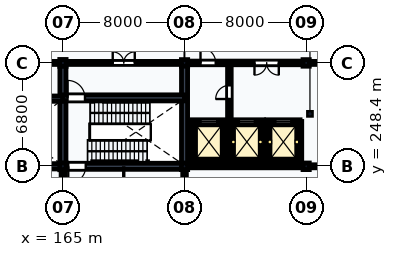
"""IFC4 building model, lengths in metres.
Left out: names, types, materials, properties, quantities, classifications, styles, units other than length and angle.
Written with IfcOpenShell. Run it as: python <this file> out.ifc"""

import sys

from ifc_helpers import new_model, si_unit, direction, frame, frame_2d, origin, origin_2d, place, context, subcontext, project, spatial, rectangle, i_section, extrude, element, fill, save


model = new_model("IFC4")
c1 = context("Model", 3, precision=1e-05, world=origin(), true_north=direction((0.0, 1.0)))
c2 = subcontext(c1, "Body", "Model", "MODEL_VIEW")
j1 = project(units=[si_unit("LENGTHUNIT", "METRE"), si_unit("PLANEANGLEUNIT", "RADIAN")], contexts=[c1])
p1 = place(None, origin())
s1 = spatial("IfcSite", under=j1, at=p1, CompositionType="ELEMENT")
p2 = place(p1, origin())
s2 = spatial("IfcBuilding", under=s1, at=p2, CompositionType="ELEMENT")
p3 = place(p2, origin())
s3 = spatial("IfcBuildingStorey", under=s2, at=p3, CompositionType="ELEMENT", Elevation=0.0)
for number, where, z_axis, x_axis in (
    (1, (165.0, 248.4, 0.0), (0.0, 0.0, 1.0), (1.0, 0.0, 0.0)),
    (2, (165.0, 255.2, 0.0), (0.0, 0.0, 1.0), (1.0, 0.0, 0.0)),
):
    element("IfcColumn", number, at=place(p3, frame(where, z_axis=z_axis, x_axis=x_axis)), inside=s3, PredefinedType="COLUMN", context=c2, shape_type="SweptSolid", body=[
        extrude(i_section(OverallWidth=0.418, OverallDepth=0.455, WebThickness=0.042, FlangeThickness=0.068, FilletRadius=0.015, at=origin_2d()), origin(), (0.0, 0.0, 1.0), 5.4),
    ])
for number, where, z_axis, x_axis in (
    (3, (173.0, 248.4, 0.0), (0.0, 0.0, 1.0), (1.0, 0.0, 0.0)),
    (4, (173.0, 255.2, 0.0), (0.0, 0.0, 1.0), (1.0, 0.0, 0.0)),
    (5, (181.0, 248.4, 0.0), (0.0, 0.0, 1.0), (1.0, 0.0, 0.0)),
    (6, (181.0, 255.2, 0.0), (0.0, 0.0, 1.0), (1.0, 0.0, 0.0)),
):
    element("IfcColumn", number, at=place(p3, frame(where, z_axis=z_axis, x_axis=x_axis)), inside=s3, PredefinedType="COLUMN", context=c2, shape_type="SweptSolid", body=[
        extrude(i_section(OverallWidth=0.412, OverallDepth=0.435, WebThickness=0.036, FlangeThickness=0.057, FilletRadius=0.015, at=origin_2d()), origin(), (0.0, 0.0, 1.0), 5.4),
    ])
p4 = place(p3, frame((165.0, 248.4, 0.0), z_axis=(0.0, 0.0, 1.0), x_axis=(1.0, 0.0, 0.0)))
e7 = element("IfcWall", 7, at=p4, inside=s3, PredefinedType="SHEAR", context=c2, shape_type="SweptSolid", body=[
    extrude(rectangle(XDim=8.0, YDim=0.4, at=frame_2d((4.0, 0.0))), origin(), (0.0, 0.0, 1.0), 5.14),
])
p5 = place(p4, frame((0.35, 0.0, 0.0)))
e8 = element("IfcOpeningElement", 8, at=p5, cuts=e7, PredefinedType="OPENING", context=c2, shape_type="SweptSolid", body=[
    extrude(rectangle(XDim=1.15, YDim=2.15, at=frame_2d((0.575, 1.075))), frame((0.0, 0.215, 0.0), z_axis=(0.0, -1.0, 0.0), x_axis=(1.0, 0.0, 0.0)), (0.0, 0.0, 1.0), 0.43),
])
for number, where, z_axis, x_axis in (
    (9, (165.0, 248.4, 0.0), (0.0, 0.0, 1.0), (0.0, 1.0, 0.0)),
    (10, (173.0, 248.4, 0.0), (0.0, 0.0, 1.0), (0.0, 1.0, 0.0)),
):
    element("IfcWall", number, at=place(p3, frame(where, z_axis=z_axis, x_axis=x_axis)), inside=s3, PredefinedType="SHEAR", context=c2, shape_type="SweptSolid", body=[
        extrude(rectangle(XDim=6.8, YDim=0.4, at=frame_2d((3.4, 0.0))), origin(), (0.0, 0.0, 1.0), 5.14),
    ])
p6 = place(p3, frame((165.0, 252.9, 0.0), z_axis=(0.0, 0.0, 1.0), x_axis=(1.0, 0.0, 0.0)))
e11 = element("IfcWall", 11, at=p6, inside=s3, PredefinedType="SHEAR", context=c2, shape_type="SweptSolid", body=[
    extrude(rectangle(XDim=8.0, YDim=0.4, at=frame_2d((4.0, 0.0))), origin(), (0.0, 0.0, 1.0), 5.14),
])
p7 = place(p6, frame((0.3, 0.0, 0.0)))
e12 = element("IfcOpeningElement", 12, at=p7, cuts=e11, PredefinedType="OPENING", context=c2, shape_type="SweptSolid", body=[
    extrude(rectangle(XDim=1.15, YDim=2.15, at=frame_2d((0.575, 1.075))), frame((0.0, 0.215, 0.0), z_axis=(0.0, -1.0, 0.0), x_axis=(1.0, 0.0, 0.0)), (0.0, 0.0, 1.0), 0.43),
])
p8 = place(p3, frame((165.0, 255.2, 0.0), z_axis=(0.0, 0.0, 1.0), x_axis=(1.0, 0.0, 0.0)))
e13 = element("IfcWall", 13, at=p8, inside=s3, PredefinedType="PARTITIONING", context=c2, shape_type="SweptSolid", body=[
    extrude(rectangle(XDim=8.0, YDim=0.2, at=frame_2d((4.0, 0.0))), origin(), (0.0, 0.0, 1.0), 4.638),
])
p9 = place(p8, frame((3.275, 0.0, 0.0)))
e14 = element("IfcOpeningElement", 14, at=p9, cuts=e13, PredefinedType="OPENING", context=c2, shape_type="SweptSolid", body=[
    extrude(rectangle(XDim=1.45, YDim=2.2, at=frame_2d((0.725, 1.1))), frame((0.0, 0.115, 0.0), z_axis=(0.0, -1.0, 0.0), x_axis=(1.0, 0.0, 0.0)), (0.0, 0.0, 1.0), 0.23),
])
p10 = place(p3, frame((157.5, 248.4, 0.0), z_axis=(0.0, 0.0, 1.0), x_axis=(1.0, 0.0, 0.0)))
e15 = element("IfcWall", 15, at=p10, inside=s3, PredefinedType="SHEAR", context=c2, shape_type="SweptSolid", body=[
    extrude(rectangle(XDim=7.5, YDim=0.35, at=frame_2d((3.75, 0.0))), origin(), (0.0, 0.0, 1.0), 5.14),
])
p11 = place(p10, frame((0.325, 0.0, 0.0)))
e16 = element("IfcOpeningElement", 16, at=p11, cuts=e15, PredefinedType="OPENING", context=c2, shape_type="SweptSolid", body=[
    extrude(rectangle(XDim=1.15, YDim=2.15, at=frame_2d((0.575, 1.075))), frame((0.0, 0.19, 0.0), z_axis=(0.0, -1.0, 0.0), x_axis=(1.0, 0.0, 0.0)), (0.0, 0.0, 1.0), 0.38),
])
p12 = place(p3, frame((157.5, 252.85, 0.0), z_axis=(0.0, 0.0, 1.0), x_axis=(1.0, 0.0, 0.0)))
e17 = element("IfcWall", 17, at=p12, inside=s3, PredefinedType="SHEAR", context=c2, shape_type="SweptSolid", body=[
    extrude(rectangle(XDim=7.5, YDim=0.35, at=frame_2d((3.75, 0.0))), origin(), (0.0, 0.0, 1.0), 5.14),
])
p13 = place(p12, frame((0.275, 0.0, 0.0)))
e18 = element("IfcOpeningElement", 18, at=p13, cuts=e17, PredefinedType="OPENING", context=c2, shape_type="SweptSolid", body=[
    extrude(rectangle(XDim=1.15, YDim=2.15, at=frame_2d((0.575, 1.075))), frame((0.0, 0.19, 0.0), z_axis=(0.0, -1.0, 0.0), x_axis=(1.0, 0.0, 0.0)), (0.0, 0.0, 1.0), 0.38),
])
p14 = place(p3, frame((157.5, 255.2, 0.0), z_axis=(0.0, 0.0, 1.0), x_axis=(1.0, 0.0, 0.0)))
e19 = element("IfcWall", 19, at=p14, inside=s3, PredefinedType="PARTITIONING", context=c2, shape_type="SweptSolid", body=[
    extrude(rectangle(XDim=7.5, YDim=0.2, at=frame_2d((3.75, 0.0))), origin(), (0.0, 0.0, 1.0), 4.778),
])
p15 = place(p14, frame((3.025, 0.0, 0.0)))
e20 = element("IfcOpeningElement", 20, at=p15, cuts=e19, PredefinedType="OPENING", context=c2, shape_type="SweptSolid", body=[
    extrude(rectangle(XDim=1.45, YDim=2.2, at=frame_2d((0.725, 1.1))), frame((0.0, 0.115, 0.0), z_axis=(0.0, -1.0, 0.0), x_axis=(1.0, 0.0, 0.0)), (0.0, 0.0, 1.0), 0.23),
])
p16 = place(p3, frame((173.5, 248.65, 0.0), z_axis=(0.0, 0.0, 1.0), x_axis=(1.0, 0.0, 0.0)))
e21 = element("IfcWall", 21, at=p16, inside=s3, PredefinedType="SHEAR", context=c2, shape_type="SweptSolid", body=[
    extrude(rectangle(XDim=2.2, YDim=0.22, at=frame_2d((1.1, 0.0))), origin(), (0.0, 0.0, 1.0), 5.14),
])
for number, where, z_axis, x_axis in (
    (22, (173.5, 248.65, 0.0), (0.0, 0.0, 1.0), (0.0, 1.0, 0.0)),
    (23, (175.7, 248.65, 0.0), (0.0, 0.0, 1.0), (0.0, 1.0, 0.0)),
):
    element("IfcWall", number, at=place(p3, frame(where, z_axis=z_axis, x_axis=x_axis)), inside=s3, PredefinedType="SHEAR", context=c2, shape_type="SweptSolid", body=[
        extrude(rectangle(XDim=2.7, YDim=0.22, at=frame_2d((1.35, 0.0))), origin(), (0.0, 0.0, 1.0), 5.14),
    ])
p17 = place(p3, frame((173.5, 251.35, 0.0), z_axis=(0.0, 0.0, 1.0), x_axis=(1.0, 0.0, 0.0)))
e24 = element("IfcWall", 24, at=p17, inside=s3, PredefinedType="SHEAR", context=c2, shape_type="SweptSolid", body=[
    extrude(rectangle(XDim=2.2, YDim=0.22, at=frame_2d((1.1, 0.0))), origin(), (0.0, 0.0, 1.0), 5.14),
])
p18 = place(p17, frame((0.55, 0.0, 0.0)))
e25 = element("IfcOpeningElement", 25, at=p18, cuts=e24, PredefinedType="OPENING", context=c2, shape_type="SweptSolid", body=[
    extrude(rectangle(XDim=1.1, YDim=2.15, at=frame_2d((0.55, 1.075))), frame((0.0, 0.125, 0.0), z_axis=(0.0, -1.0, 0.0), x_axis=(1.0, 0.0, 0.0)), (0.0, 0.0, 1.0), 0.25),
])
p19 = place(p3, frame((176.0, 248.65, 0.0), z_axis=(0.0, 0.0, 1.0), x_axis=(1.0, 0.0, 0.0)))
e26 = element("IfcWall", 26, at=p19, inside=s3, PredefinedType="SHEAR", context=c2, shape_type="SweptSolid", body=[
    extrude(rectangle(XDim=2.2, YDim=0.22, at=frame_2d((1.1, 0.0))), origin(), (0.0, 0.0, 1.0), 5.14),
])
for number, where, z_axis, x_axis in (
    (27, (176.0, 248.65, 0.0), (0.0, 0.0, 1.0), (0.0, 1.0, 0.0)),
    (28, (178.2, 248.65, 0.0), (0.0, 0.0, 1.0), (0.0, 1.0, 0.0)),
):
    element("IfcWall", number, at=place(p3, frame(where, z_axis=z_axis, x_axis=x_axis)), inside=s3, PredefinedType="SHEAR", context=c2, shape_type="SweptSolid", body=[
        extrude(rectangle(XDim=2.7, YDim=0.22, at=frame_2d((1.35, 0.0))), origin(), (0.0, 0.0, 1.0), 5.14),
    ])
p20 = place(p3, frame((176.0, 251.35, 0.0), z_axis=(0.0, 0.0, 1.0), x_axis=(1.0, 0.0, 0.0)))
e29 = element("IfcWall", 29, at=p20, inside=s3, PredefinedType="SHEAR", context=c2, shape_type="SweptSolid", body=[
    extrude(rectangle(XDim=2.2, YDim=0.22, at=frame_2d((1.1, 0.0))), origin(), (0.0, 0.0, 1.0), 5.14),
])
p21 = place(p20, frame((0.575, 0.0, 0.0)))
e30 = element("IfcOpeningElement", 30, at=p21, cuts=e29, PredefinedType="OPENING", context=c2, shape_type="SweptSolid", body=[
    extrude(rectangle(XDim=1.05, YDim=2.15, at=frame_2d((0.525, 1.075))), frame((0.0, 0.125, 0.0), z_axis=(0.0, -1.0, 0.0), x_axis=(1.0, 0.0, 0.0)), (0.0, 0.0, 1.0), 0.25),
])
p22 = place(p3, frame((178.4, 248.65, 0.0), z_axis=(0.0, 0.0, 1.0), x_axis=(1.0, 0.0, 0.0)))
e31 = element("IfcWall", 31, at=p22, inside=s3, PredefinedType="SHEAR", context=c2, shape_type="SweptSolid", body=[
    extrude(rectangle(XDim=2.2, YDim=0.22, at=frame_2d((1.1, 0.0))), origin(), (0.0, 0.0, 1.0), 5.14),
])
for number, where, z_axis, x_axis in (
    (32, (178.4, 248.65, 0.0), (0.0, 0.0, 1.0), (0.0, 1.0, 0.0)),
    (33, (180.6, 248.65, 0.0), (0.0, 0.0, 1.0), (0.0, 1.0, 0.0)),
):
    element("IfcWall", number, at=place(p3, frame(where, z_axis=z_axis, x_axis=x_axis)), inside=s3, PredefinedType="SHEAR", context=c2, shape_type="SweptSolid", body=[
        extrude(rectangle(XDim=2.7, YDim=0.22, at=frame_2d((1.35, 0.0))), origin(), (0.0, 0.0, 1.0), 5.14),
    ])
p23 = place(p3, frame((178.4, 251.35, 0.0), z_axis=(0.0, 0.0, 1.0), x_axis=(1.0, 0.0, 0.0)))
e34 = element("IfcWall", 34, at=p23, inside=s3, PredefinedType="SHEAR", context=c2, shape_type="SweptSolid", body=[
    extrude(rectangle(XDim=2.2, YDim=0.22, at=frame_2d((1.1, 0.0))), origin(), (0.0, 0.0, 1.0), 5.14),
])
p24 = place(p23, frame((0.575, 0.0, 0.0)))
e35 = element("IfcOpeningElement", 35, at=p24, cuts=e34, PredefinedType="OPENING", context=c2, shape_type="SweptSolid", body=[
    extrude(rectangle(XDim=1.05, YDim=2.15, at=frame_2d((0.525, 1.075))), frame((0.0, 0.125, 0.0), z_axis=(0.0, -1.0, 0.0), x_axis=(1.0, 0.0, 0.0)), (0.0, 0.0, 1.0), 0.25),
])
p25 = place(p3, frame((175.95, 251.35, 0.0), z_axis=(0.0, 0.0, 1.0), x_axis=(0.0, 1.0, 0.0)))
e36 = element("IfcWall", 36, at=p25, inside=s3, PredefinedType="PARTITIONING", context=c2, shape_type="SweptSolid", body=[
    extrude(rectangle(XDim=3.85, YDim=0.24, at=frame_2d((1.925, 0.0))), origin(), (0.0, 0.0, 1.0), 5.14),
])
p26 = place(p25, frame((1.475, 0.0, 0.0)))
e37 = element("IfcOpeningElement", 37, at=p26, cuts=e36, PredefinedType="OPENING", context=c2, shape_type="SweptSolid", body=[
    extrude(rectangle(XDim=0.9, YDim=2.1, at=frame_2d((0.45, 1.05))), frame((0.0, 0.135, 0.0), z_axis=(0.0, -1.0, 0.0), x_axis=(1.0, 0.0, 0.0)), (0.0, 0.0, 1.0), 0.27),
])
p27 = place(p3, frame((181.0, 248.4, 0.0), z_axis=(0.0, 0.0, 1.0), x_axis=(1.0, 0.0, 0.0)))
e38 = element("IfcWall", 38, at=p27, inside=s3, PredefinedType="PARTITIONING", context=c2, shape_type="SweptSolid", body=[
    extrude(rectangle(XDim=8.0, YDim=0.2, at=frame_2d((4.0, 0.0))), origin(), (0.0, 0.0, 1.0), 4.638),
])
p28 = place(p3, frame((173.0, 255.2, 0.0), z_axis=(0.0, 0.0, 1.0), x_axis=(1.0, 0.0, 0.0)))
e39 = element("IfcWall", 39, at=p28, inside=s3, PredefinedType="PARTITIONING", context=c2, shape_type="SweptSolid", body=[
    extrude(rectangle(XDim=8.0, YDim=0.24, at=frame_2d((4.0, 0.0))), origin(), (0.0, 0.0, 1.0), 4.638),
])
p29 = place(p28, frame((1.05, 0.0, 0.0)))
e40 = element("IfcOpeningElement", 40, at=p29, cuts=e39, PredefinedType="OPENING", context=c2, shape_type="SweptSolid", body=[
    extrude(rectangle(XDim=1.0, YDim=2.1, at=frame_2d((0.5, 1.05))), frame((0.0, 0.135, 0.0), z_axis=(0.0, -1.0, 0.0), x_axis=(1.0, 0.0, 0.0)), (0.0, 0.0, 1.0), 0.27),
])
p30 = place(p28, frame((4.6, 0.0, 0.0)))
e41 = element("IfcOpeningElement", 41, at=p30, cuts=e39, PredefinedType="OPENING", context=c2, shape_type="SweptSolid", body=[
    extrude(rectangle(XDim=1.6, YDim=2.25, at=frame_2d((0.8, 1.125))), frame((0.0, 0.135, 0.0), z_axis=(0.0, -1.0, 0.0), x_axis=(1.0, 0.0, 0.0)), (0.0, 0.0, 1.0), 0.27),
])
p31 = place(p3, frame((181.0, 255.2, 0.0), z_axis=(0.0, 0.0, 1.0), x_axis=(1.0, 0.0, 0.0)))
e42 = element("IfcWall", 42, at=p31, inside=s3, PredefinedType="PARTITIONING", context=c2, shape_type="SweptSolid", body=[
    extrude(rectangle(XDim=8.0, YDim=0.2, at=frame_2d((4.0, 0.0))), origin(), (0.0, 0.0, 1.0), 4.638),
])
p32 = place(p31, frame((0.85, 0.0, 0.0)))
e43 = element("IfcOpeningElement", 43, at=p32, cuts=e42, PredefinedType="OPENING", context=c2, shape_type="SweptSolid", body=[
    extrude(rectangle(XDim=0.9, YDim=2.1, at=frame_2d((0.45, 1.05))), frame((0.0, 0.115, 0.0), z_axis=(0.0, -1.0, 0.0), x_axis=(1.0, 0.0, 0.0)), (0.0, 0.0, 1.0), 0.23),
])
p33 = place(p31, frame((3.25, 0.0, 0.0)))
e44 = element("IfcOpeningElement", 44, at=p33, cuts=e42, PredefinedType="OPENING", context=c2, shape_type="SweptSolid", body=[
    extrude(rectangle(XDim=0.9, YDim=2.1, at=frame_2d((0.45, 1.05))), frame((0.0, 0.115, 0.0), z_axis=(0.0, -1.0, 0.0), x_axis=(1.0, 0.0, 0.0)), (0.0, 0.0, 1.0), 0.23),
])
p34 = place(p31, frame((5.075, 0.0, 0.0)))
e45 = element("IfcOpeningElement", 45, at=p34, cuts=e42, PredefinedType="OPENING", context=c2, shape_type="SweptSolid", body=[
    extrude(rectangle(XDim=0.95, YDim=2.1, at=frame_2d((0.475, 1.05))), frame((0.0, 0.115, 0.0), z_axis=(0.0, -1.0, 0.0), x_axis=(1.0, 0.0, 0.0)), (0.0, 0.0, 1.0), 0.23),
])
p35 = place(p31, frame((6.5, 0.0, 0.0)))
e46 = element("IfcOpeningElement", 46, at=p35, cuts=e42, PredefinedType="OPENING", context=c2, shape_type="SweptSolid", body=[
    extrude(rectangle(XDim=0.85, YDim=2.1, at=frame_2d((0.425, 1.05))), frame((0.0, 0.115, 0.0), z_axis=(0.0, -1.0, 0.0), x_axis=(1.0, 0.0, 0.0)), (0.0, 0.0, 1.0), 0.23),
])
p36 = place(p3, frame((165.0, 245.6, 0.0), z_axis=(0.0, 0.0, 1.0), x_axis=(0.0, 1.0, 0.0)))
e47 = element("IfcWall", 47, at=p36, inside=s3, PredefinedType="PARTITIONING", context=c2, shape_type="SweptSolid", body=[
    extrude(rectangle(XDim=2.8, YDim=0.24, at=frame_2d((1.4, 0.0))), origin(), (0.0, 0.0, 1.0), 4.688),
])
p37 = place(p36, frame((0.7, 0.0, 0.0)))
e48 = element("IfcOpeningElement", 48, at=p37, cuts=e47, PredefinedType="OPENING", context=c2, shape_type="SweptSolid", body=[
    extrude(rectangle(XDim=1.1, YDim=2.1, at=frame_2d((0.55, 1.05))), frame((0.0, 0.135, 0.0), z_axis=(0.0, -1.0, 0.0), x_axis=(1.0, 0.0, 0.0)), (0.0, 0.0, 1.0), 0.27),
])
p38 = place(p3, frame((173.0, 240.0, 0.0), z_axis=(0.0, 0.0, 1.0), x_axis=(0.0, 1.0, 0.0)))
e49 = element("IfcWall", 49, at=p38, inside=s3, PredefinedType="PARTITIONING", context=c2, shape_type="SweptSolid", body=[
    extrude(rectangle(XDim=8.4, YDim=0.24, at=frame_2d((4.2, 0.0))), origin(), (0.0, 0.0, 1.0), 4.688),
])
p39 = place(p38, frame((3.45, 0.0, 0.0)))
e50 = element("IfcOpeningElement", 50, at=p39, cuts=e49, PredefinedType="OPENING", context=c2, shape_type="SweptSolid", body=[
    extrude(rectangle(XDim=1.5, YDim=2.1, at=frame_2d((0.75, 1.05))), frame((0.0, 0.135, 0.0), z_axis=(0.0, -1.0, 0.0), x_axis=(1.0, 0.0, 0.0)), (0.0, 0.0, 1.0), 0.27),
])
p40 = place(p3, frame((173.0, 248.4, 0.0), z_axis=(0.0, 0.0, 1.0), x_axis=(1.0, 0.0, 0.0)))
e51 = element("IfcWall", 51, at=p40, inside=s3, PredefinedType="PARTITIONING", context=c2, shape_type="SweptSolid", body=[
    extrude(rectangle(XDim=8.0, YDim=0.2, at=frame_2d((4.0, 0.0))), origin(), (0.0, 0.0, 1.0), 4.638),
])
p41 = place(p7, origin())
e52 = element("IfcDoor", 52, at=p41, inside=s3, OperationType="SINGLE_SWING_LEFT", PredefinedType="DOOR", context=c2, shape_type="SweptSolid", body=[
    extrude(rectangle(XDim=1.15, YDim=2.15, at=frame_2d((0.575, 1.075))), frame((0.0, 0.025, 0.0), z_axis=(0.0, -1.0, 0.0), x_axis=(1.0, 0.0, 0.0)), (0.0, 0.0, 1.0), 0.05),
])
fill(e12, e52)
p42 = place(p5, frame((1.15, 0.0, 0.0), z_axis=(0.0, 0.0, 1.0), x_axis=(-1.0, 0.0, 0.0)))
e53 = element("IfcDoor", 53, at=p42, inside=s3, OperationType="SINGLE_SWING_RIGHT", PredefinedType="DOOR", context=c2, shape_type="SweptSolid", body=[
    extrude(rectangle(XDim=1.15, YDim=2.15, at=frame_2d((0.575, 1.075))), frame((0.0, 0.025, 0.0), z_axis=(0.0, -1.0, 0.0), x_axis=(1.0, 0.0, 0.0)), (0.0, 0.0, 1.0), 0.05),
])
fill(e8, e53)
p43 = place(p9, origin())
e54 = element("IfcDoor", 54, at=p43, inside=s3, OperationType="DOUBLE_DOOR_SINGLE_SWING", PredefinedType="DOOR", context=c2, shape_type="SweptSolid", body=[
    extrude(rectangle(XDim=1.45, YDim=2.2, at=frame_2d((0.725, 1.1))), frame((0.0, 0.025, 0.0), z_axis=(0.0, -1.0, 0.0), x_axis=(1.0, 0.0, 0.0)), (0.0, 0.0, 1.0), 0.05),
])
fill(e14, e54)
p44 = place(p18, origin())
e55 = element("IfcDoor", 55, at=p44, inside=s3, OperationType="DOUBLE_DOOR_SLIDING", PredefinedType="USERDEFINED", context=c2, shape_type="SweptSolid", body=[
    extrude(rectangle(XDim=1.1, YDim=2.15, at=frame_2d((0.55, 1.075))), frame((0.0, 0.025, 0.0), z_axis=(0.0, -1.0, 0.0), x_axis=(1.0, 0.0, 0.0)), (0.0, 0.0, 1.0), 0.05),
])
fill(e25, e55)
p45 = place(p21, origin())
e56 = element("IfcDoor", 56, at=p45, inside=s3, OperationType="DOUBLE_DOOR_SLIDING", PredefinedType="USERDEFINED", context=c2, shape_type="SweptSolid", body=[
    extrude(rectangle(XDim=1.05, YDim=2.15, at=frame_2d((0.525, 1.075))), frame((0.0, 0.025, 0.0), z_axis=(0.0, -1.0, 0.0), x_axis=(1.0, 0.0, 0.0)), (0.0, 0.0, 1.0), 0.05),
])
fill(e30, e56)
p46 = place(p24, origin())
e57 = element("IfcDoor", 57, at=p46, inside=s3, OperationType="DOUBLE_DOOR_SLIDING", PredefinedType="USERDEFINED", context=c2, shape_type="SweptSolid", body=[
    extrude(rectangle(XDim=1.05, YDim=2.15, at=frame_2d((0.525, 1.075))), frame((0.0, 0.025, 0.0), z_axis=(0.0, -1.0, 0.0), x_axis=(1.0, 0.0, 0.0)), (0.0, 0.0, 1.0), 0.05),
])
fill(e35, e57)
p47 = place(p26, origin())
e58 = element("IfcDoor", 58, at=p47, inside=s3, OperationType="SINGLE_SWING_LEFT", PredefinedType="DOOR", context=c2, shape_type="SweptSolid", body=[
    extrude(rectangle(XDim=0.9, YDim=2.1, at=frame_2d((0.45, 1.05))), frame((0.0, 0.025, 0.0), z_axis=(0.0, -1.0, 0.0), x_axis=(1.0, 0.0, 0.0)), (0.0, 0.0, 1.0), 0.05),
])
fill(e37, e58)
p48 = place(p29, origin())
e59 = element("IfcDoor", 59, at=p48, inside=s3, OperationType="SINGLE_SWING_LEFT", PredefinedType="DOOR", context=c2, shape_type="SweptSolid", body=[
    extrude(rectangle(XDim=1.0, YDim=2.1, at=frame_2d((0.5, 1.05))), frame((0.0, 0.025, 0.0), z_axis=(0.0, -1.0, 0.0), x_axis=(1.0, 0.0, 0.0)), (0.0, 0.0, 1.0), 0.05),
])
fill(e40, e59)
p49 = place(p30, frame((1.6, 0.0, 0.0), z_axis=(0.0, 0.0, 1.0), x_axis=(-1.0, 0.0, 0.0)))
e60 = element("IfcDoor", 60, at=p49, inside=s3, OperationType="DOUBLE_DOOR_SINGLE_SWING", PredefinedType="DOOR", context=c2, shape_type="SweptSolid", body=[
    extrude(rectangle(XDim=1.6, YDim=2.25, at=frame_2d((0.8, 1.125))), frame((0.0, 0.025, 0.0), z_axis=(0.0, -1.0, 0.0), x_axis=(1.0, 0.0, 0.0)), (0.0, 0.0, 1.0), 0.05),
])
fill(e41, e60)
save(model, sys.argv[1])
